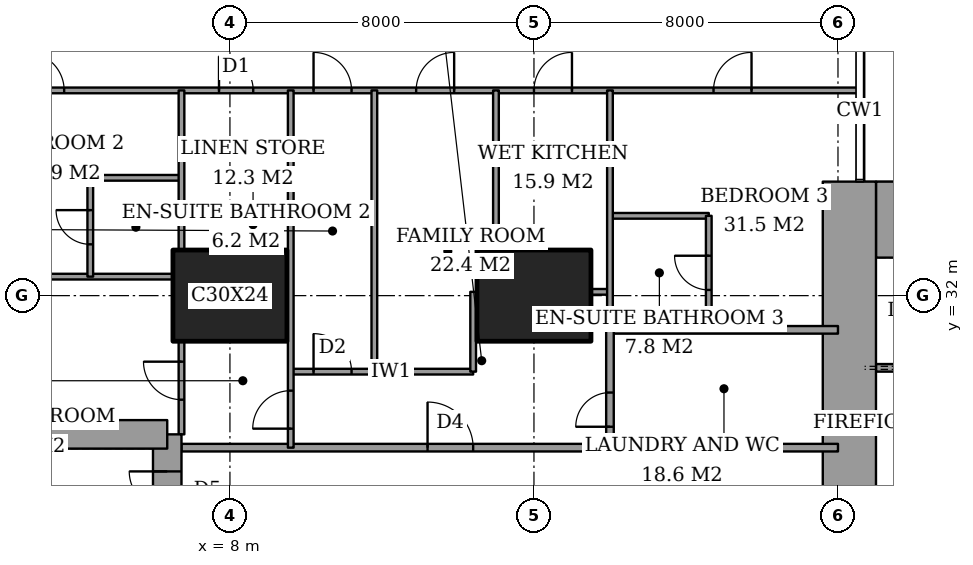
"""IFC4 building model, lengths in metres.
Left out: names, types, materials, properties, quantities, classifications, styles, units other than length and angle.
Written with IfcOpenShell. Run it as: python <this file> out.ifc"""

import sys

from ifc_helpers import new_model, si_unit, direction, frame, frame_2d, origin, origin_2d, place, context, subcontext, project, spatial, rectangle, extrude, element, fill, save


model = new_model("IFC4")
c1 = context("Model", 3, precision=1e-05, world=origin(), true_north=direction((0.0, 1.0)))
c2 = subcontext(c1, "Body", "Model", "MODEL_VIEW")
j1 = project(units=[si_unit("LENGTHUNIT", "METRE"), si_unit("PLANEANGLEUNIT", "RADIAN")], contexts=[c1])
p1 = place(None, origin())
s1 = spatial("IfcSite", under=j1, at=p1, CompositionType="ELEMENT")
p2 = place(p1, origin())
s2 = spatial("IfcBuilding", under=s1, at=p2, CompositionType="ELEMENT")
p3 = place(p2, frame((0.0, 0.0, 47.6)))
s3 = spatial("IfcBuildingStorey", under=s2, at=p3, CompositionType="ELEMENT", Elevation=47.6)
for number, where, z_axis, x_axis in (
    (1, (8.0, 32.0, 0.0), (0.0, 0.0, 1.0), (1.0, 0.0, 0.0)),
    (2, (16.0, 32.0, 0.0), (0.0, 0.0, 1.0), (1.0, 0.0, 0.0)),
):
    element("IfcColumn", number, at=place(p3, frame(where, z_axis=z_axis, x_axis=x_axis)), inside=s3, PredefinedType="COLUMN", context=c2, shape_type="SweptSolid", body=[
        extrude(rectangle(XDim=3.0, YDim=2.4, at=origin_2d()), origin(), (0.0, 0.0, 1.0), 3.6),
    ])
p4 = place(p3, frame((25.0, 34.0, 0.0), z_axis=(0.0, 0.0, 1.0), x_axis=(1.0, 0.0, 0.0)))
e3 = element("IfcWall", 3, at=p4, inside=s3, PredefinedType="SHEAR", context=c2, shape_type="SweptSolid", body=[
    extrude(rectangle(XDim=3.15, YDim=2.0, at=frame_2d((1.575, 0.0))), origin(), (0.0, 0.0, 1.0), 3.6),
])
p5 = place(p3, frame((24.3, 23.15, 0.0), z_axis=(0.0, 0.0, 1.0), x_axis=(0.0, 1.0, 0.0)))
e4 = element("IfcWall", 4, at=p5, inside=s3, PredefinedType="SHEAR", context=c2, shape_type="SweptSolid", body=[
    extrude(rectangle(XDim=11.85, YDim=1.4, at=frame_2d((5.925, 0.0))), origin(), (0.0, 0.0, 1.0), 3.6),
])
p6 = place(p5, frame((0.75, 0.0, 0.0)))
e5 = element("IfcOpeningElement", 5, at=p6, cuts=e4, PredefinedType="OPENING", context=c2, shape_type="SweptSolid", body=[
    extrude(rectangle(XDim=1.8, YDim=2.4, at=frame_2d((0.9, 1.2))), frame((0.0, 0.71, 0.0), z_axis=(0.0, -1.0, 0.0), x_axis=(1.0, 0.0, 0.0)), (0.0, 0.0, 1.0), 1.42),
])
p7 = place(p3, frame((6.35, 19.65, 0.0), z_axis=(0.0, 0.0, 1.0), x_axis=(0.0, 1.0, 0.0)))
e6 = element("IfcWall", 6, at=p7, inside=s3, PredefinedType="SHEAR", context=c2, shape_type="SweptSolid", body=[
    extrude(rectangle(XDim=8.7, YDim=0.75, at=frame_2d((4.35, 0.0))), origin(), (0.0, 0.0, 1.0), 3.6),
])
p8 = place(p7, frame((6.725, 0.0, 0.0)))
e7 = element("IfcOpeningElement", 7, at=p8, cuts=e6, PredefinedType="OPENING", context=c2, shape_type="SweptSolid", body=[
    extrude(rectangle(XDim=1.0, YDim=2.1, at=frame_2d((0.5, 1.05))), frame((0.0, 0.385, 0.0), z_axis=(0.0, -1.0, 0.0), x_axis=(1.0, 0.0, 0.0)), (0.0, 0.0, 1.0), 0.77),
])
p9 = place(p3, frame((6.35, 28.35, 0.0), z_axis=(0.0, 0.0, 1.0), x_axis=(-1.0, 0.0, 0.0)))
e8 = element("IfcWall", 8, at=p9, inside=s3, PredefinedType="SHEAR", context=c2, shape_type="SweptSolid", body=[
    extrude(rectangle(XDim=4.45, YDim=0.75, at=frame_2d((2.225, 0.0))), origin(), (0.0, 0.0, 1.0), 3.6),
])
p10 = place(p3, frame((6.725, 28.0, 0.0), z_axis=(0.0, 0.0, 1.0), x_axis=(1.0, 0.0, 0.0)))
e9 = element("IfcWall", 9, at=p10, inside=s3, PredefinedType="PARTITIONING", context=c2, shape_type="SweptSolid", body=[
    extrude(rectangle(XDim=17.275, YDim=0.2, at=frame_2d((8.637, 0.0))), origin(), (0.0, 0.0, 1.0), 3.35),
])
p11 = place(p10, frame((6.475, 0.0, 0.0)))
e10 = element("IfcOpeningElement", 10, at=p11, cuts=e9, PredefinedType="OPENING", context=c2, shape_type="SweptSolid", body=[
    extrude(rectangle(XDim=1.2, YDim=2.4, at=frame_2d((0.6, 1.2))), frame((0.0, 0.11, 0.0), z_axis=(0.0, -1.0, 0.0), x_axis=(1.0, 0.0, 0.0)), (0.0, 0.0, 1.0), 0.22),
])
p12 = place(p3, frame((9.6, 30.0, 0.0), z_axis=(0.0, 0.0, 1.0), x_axis=(1.0, 0.0, 0.0)))
e11 = element("IfcWall", 11, at=p12, inside=s3, PredefinedType="PARTITIONING", context=c2, shape_type="SweptSolid", body=[
    extrude(rectangle(XDim=4.8, YDim=0.15, at=frame_2d((2.4, 0.0))), origin(), (0.0, 0.0, 1.0), 3.35),
])
p13 = place(p12, frame((0.6, 0.0, 0.0)))
e12 = element("IfcOpeningElement", 12, at=p13, cuts=e11, PredefinedType="OPENING", context=c2, shape_type="SweptSolid", body=[
    extrude(rectangle(XDim=1.0, YDim=2.1, at=frame_2d((0.5, 1.05))), frame((0.0, 0.085, 0.0), z_axis=(0.0, -1.0, 0.0), x_axis=(1.0, 0.0, 0.0)), (0.0, 0.0, 1.0), 0.17),
])
p14 = place(p3, frame((18.0, 31.1, 0.0), z_axis=(0.0, 0.0, 1.0), x_axis=(1.0, 0.0, 0.0)))
e13 = element("IfcWall", 13, at=p14, inside=s3, PredefinedType="PARTITIONING", context=c2, shape_type="SweptSolid", body=[
    extrude(rectangle(XDim=6.0, YDim=0.2, at=frame_2d((3.0, 0.0))), origin(), (0.0, 0.0, 1.0), 3.35),
])
p15 = place(p3, frame((17.5, 32.1, 0.0), z_axis=(0.0, 0.0, 1.0), x_axis=(1.0, 0.0, 0.0)))
e14 = element("IfcWall", 14, at=p15, inside=s3, PredefinedType="PARTITIONING", context=c2, shape_type="SweptSolid", body=[
    extrude(rectangle(XDim=0.5, YDim=0.15, at=frame_2d((0.25, 0.0))), origin(), (0.0, 0.0, 1.0), 2.634),
])
p16 = place(p3, frame((1.35, 32.5, 0.0), z_axis=(0.0, 0.0, 1.0), x_axis=(1.0, 0.0, 0.0)))
e15 = element("IfcWall", 15, at=p16, inside=s3, PredefinedType="PARTITIONING", context=c2, shape_type="SweptSolid", body=[
    extrude(rectangle(XDim=5.15, YDim=0.15, at=frame_2d((2.575, 0.0))), origin(), (0.0, 0.0, 1.0), 3.35),
])
p17 = place(p3, frame((18.0, 34.1, 0.0), z_axis=(0.0, 0.0, 1.0), x_axis=(1.0, 0.0, 0.0)))
e16 = element("IfcWall", 16, at=p17, inside=s3, PredefinedType="PARTITIONING", context=c2, shape_type="SweptSolid", body=[
    extrude(rectangle(XDim=2.6, YDim=0.15, at=frame_2d((1.3, 0.0))), origin(), (0.0, 0.0, 1.0), 3.35),
])
p18 = place(p3, frame((4.325, 35.1, 0.0), z_axis=(0.0, 0.0, 1.0), x_axis=(1.0, 0.0, 0.0)))
e17 = element("IfcWall", 17, at=p18, inside=s3, PredefinedType="PARTITIONING", context=c2, shape_type="SweptSolid", body=[
    extrude(rectangle(XDim=2.4, YDim=0.15, at=frame_2d((1.2, 0.0))), origin(), (0.0, 0.0, 1.0), 3.35),
])
p19 = place(p3, frame((-0.45, 37.4, 0.0), z_axis=(0.0, 0.0, 1.0), x_axis=(1.0, 0.0, 0.0)))
e18 = element("IfcWall", 18, at=p19, inside=s3, PredefinedType="PARTITIONING", context=c2, shape_type="SweptSolid", body=[
    extrude(rectangle(XDim=25.011, YDim=0.15, at=frame_2d((12.505, 0.0))), origin(), (0.0, 0.0, 1.0), 3.35),
])
p20 = place(p19, frame((10.65, 0.0, 0.0)))
e19 = element("IfcOpeningElement", 19, at=p20, cuts=e18, PredefinedType="OPENING", context=c2, shape_type="SweptSolid", body=[
    extrude(rectangle(XDim=1.0, YDim=2.1, at=frame_2d((0.5, 1.05))), frame((0.0, 0.085, 0.0), z_axis=(0.0, -1.0, 0.0), x_axis=(1.0, 0.0, 0.0)), (0.0, 0.0, 1.0), 0.17),
])
p21 = place(p19, frame((3.087, 0.0, 0.0)))
e20 = element("IfcOpeningElement", 20, at=p21, cuts=e18, PredefinedType="OPENING", context=c2, shape_type="SweptSolid", body=[
    extrude(rectangle(XDim=1.0, YDim=2.1, at=frame_2d((0.5, 1.05))), frame((0.0, 0.085, 0.0), z_axis=(0.0, -1.0, 0.0), x_axis=(1.0, 0.0, 0.0)), (0.0, 0.0, 1.0), 0.17),
])
p22 = place(p19, frame((8.163, 0.0, 0.0)))
e21 = element("IfcOpeningElement", 21, at=p22, cuts=e18, PredefinedType="OPENING", context=c2, shape_type="SweptSolid", body=[
    extrude(rectangle(XDim=0.9, YDim=2.1, at=frame_2d((0.45, 1.05))), frame((0.0, 0.085, 0.0), z_axis=(0.0, -1.0, 0.0), x_axis=(1.0, 0.0, 0.0)), (0.0, 0.0, 1.0), 0.17),
])
p23 = place(p19, frame((13.35, 0.0, 0.0)))
e22 = element("IfcOpeningElement", 22, at=p23, cuts=e18, PredefinedType="OPENING", context=c2, shape_type="SweptSolid", body=[
    extrude(rectangle(XDim=1.0, YDim=2.1, at=frame_2d((0.5, 1.05))), frame((0.0, 0.085, 0.0), z_axis=(0.0, -1.0, 0.0), x_axis=(1.0, 0.0, 0.0)), (0.0, 0.0, 1.0), 0.17),
])
p24 = place(p19, frame((16.45, 0.0, 0.0)))
e23 = element("IfcOpeningElement", 23, at=p24, cuts=e18, PredefinedType="OPENING", context=c2, shape_type="SweptSolid", body=[
    extrude(rectangle(XDim=1.0, YDim=2.1, at=frame_2d((0.5, 1.05))), frame((0.0, 0.085, 0.0), z_axis=(0.0, -1.0, 0.0), x_axis=(1.0, 0.0, 0.0)), (0.0, 0.0, 1.0), 0.17),
])
p25 = place(p19, frame((21.175, 0.0, 0.0)))
e24 = element("IfcOpeningElement", 24, at=p25, cuts=e18, PredefinedType="OPENING", context=c2, shape_type="SweptSolid", body=[
    extrude(rectangle(XDim=1.0, YDim=2.1, at=frame_2d((0.5, 1.05))), frame((0.0, 0.085, 0.0), z_axis=(0.0, -1.0, 0.0), x_axis=(1.0, 0.0, 0.0)), (0.0, 0.0, 1.0), 0.17),
])
p26 = place(p3, frame((4.325, 32.5, 0.0), z_axis=(0.0, 0.0, 1.0), x_axis=(0.0, 1.0, 0.0)))
e25 = element("IfcWall", 25, at=p26, inside=s3, PredefinedType="PARTITIONING", context=c2, shape_type="SweptSolid", body=[
    extrude(rectangle(XDim=2.6, YDim=0.15, at=frame_2d((1.3, 0.0))), origin(), (0.0, 0.0, 1.0), 3.35),
])
p27 = place(p26, frame((0.85, 0.0, 0.0)))
e26 = element("IfcOpeningElement", 26, at=p27, cuts=e25, PredefinedType="OPENING", context=c2, shape_type="SweptSolid", body=[
    extrude(rectangle(XDim=0.9, YDim=2.1, at=frame_2d((0.45, 1.05))), frame((0.0, 0.085, 0.0), z_axis=(0.0, -1.0, 0.0), x_axis=(1.0, 0.0, 0.0)), (0.0, 0.0, 1.0), 0.17),
])
p28 = place(p3, frame((6.725, 28.35, 0.0), z_axis=(0.0, 0.0, 1.0), x_axis=(0.0, 1.0, 0.0)))
e27 = element("IfcWall", 27, at=p28, inside=s3, PredefinedType="PARTITIONING", context=c2, shape_type="SweptSolid", body=[
    extrude(rectangle(XDim=2.45, YDim=0.15, at=frame_2d((1.225, 0.0))), origin(), (0.0, 0.0, 1.0), 3.35),
])
p29 = place(p28, frame((0.913, 0.0, 0.0)))
e28 = element("IfcOpeningElement", 28, at=p29, cuts=e27, PredefinedType="OPENING", context=c2, shape_type="SweptSolid", body=[
    extrude(rectangle(XDim=1.0, YDim=2.1, at=frame_2d((0.5, 1.05))), frame((0.0, 0.085, 0.0), z_axis=(0.0, -1.0, 0.0), x_axis=(1.0, 0.0, 0.0)), (0.0, 0.0, 1.0), 0.17),
])
p30 = place(p3, frame((6.725, 33.2, 0.0), z_axis=(0.0, 0.0, 1.0), x_axis=(0.0, 1.0, 0.0)))
e29 = element("IfcWall", 29, at=p30, inside=s3, PredefinedType="PARTITIONING", context=c2, shape_type="SweptSolid", body=[
    extrude(rectangle(XDim=4.2, YDim=0.15, at=frame_2d((2.1, 0.0))), origin(), (0.0, 0.0, 1.0), 3.35),
])
p31 = place(p3, frame((9.6, 28.0, 0.0), z_axis=(0.0, 0.0, 1.0), x_axis=(0.0, 1.0, 0.0)))
e30 = element("IfcWall", 30, at=p31, inside=s3, PredefinedType="PARTITIONING", context=c2, shape_type="SweptSolid", body=[
    extrude(rectangle(XDim=9.4, YDim=0.15, at=frame_2d((4.7, 0.0))), origin(), (0.0, 0.0, 1.0), 3.35),
])
p32 = place(p31, frame((0.5, 0.0, 0.0)))
e31 = element("IfcOpeningElement", 31, at=p32, cuts=e30, PredefinedType="OPENING", context=c2, shape_type="SweptSolid", body=[
    extrude(rectangle(XDim=1.0, YDim=2.1, at=frame_2d((0.5, 1.05))), frame((0.0, 0.085, 0.0), z_axis=(0.0, -1.0, 0.0), x_axis=(1.0, 0.0, 0.0)), (0.0, 0.0, 1.0), 0.17),
])
p33 = place(p3, frame((11.8, 30.0, 0.0), z_axis=(0.0, 0.0, 1.0), x_axis=(0.0, 1.0, 0.0)))
e32 = element("IfcWall", 32, at=p33, inside=s3, PredefinedType="PARTITIONING", context=c2, shape_type="SweptSolid", body=[
    extrude(rectangle(XDim=7.4, YDim=0.15, at=frame_2d((3.7, 0.0))), origin(), (0.0, 0.0, 1.0), 3.35),
])
p34 = place(p3, frame((14.4, 30.0, 0.0), z_axis=(0.0, 0.0, 1.0), x_axis=(0.0, 1.0, 0.0)))
e33 = element("IfcWall", 33, at=p34, inside=s3, PredefinedType="PARTITIONING", context=c2, shape_type="SweptSolid", body=[
    extrude(rectangle(XDim=2.1, YDim=0.15, at=frame_2d((1.05, 0.0))), origin(), (0.0, 0.0, 1.0), 3.35),
])
p35 = place(p3, frame((15.0, 33.2, 0.0), z_axis=(0.0, 0.0, 1.0), x_axis=(0.0, 1.0, 0.0)))
e34 = element("IfcWall", 34, at=p35, inside=s3, PredefinedType="PARTITIONING", context=c2, shape_type="SweptSolid", body=[
    extrude(rectangle(XDim=4.2, YDim=0.15, at=frame_2d((2.1, 0.0))), origin(), (0.0, 0.0, 1.0), 3.35),
])
p36 = place(p3, frame((18.0, 28.0, 0.0), z_axis=(0.0, 0.0, 1.0), x_axis=(0.0, 1.0, 0.0)))
e35 = element("IfcWall", 35, at=p36, inside=s3, PredefinedType="PARTITIONING", context=c2, shape_type="SweptSolid", body=[
    extrude(rectangle(XDim=3.1, YDim=0.2, at=frame_2d((1.55, 0.0))), origin(), (0.0, 0.0, 1.0), 3.35),
])
p37 = place(p36, frame((0.55, 0.0, 0.0)))
e36 = element("IfcOpeningElement", 36, at=p37, cuts=e35, PredefinedType="OPENING", context=c2, shape_type="SweptSolid", body=[
    extrude(rectangle(XDim=0.9, YDim=2.1, at=frame_2d((0.45, 1.05))), frame((0.0, 0.11, 0.0), z_axis=(0.0, -1.0, 0.0), x_axis=(1.0, 0.0, 0.0)), (0.0, 0.0, 1.0), 0.22),
])
p38 = place(p3, frame((18.0, 31.1, 0.0), z_axis=(0.0, 0.0, 1.0), x_axis=(0.0, 1.0, 0.0)))
e37 = element("IfcWall", 37, at=p38, inside=s3, PredefinedType="PARTITIONING", context=c2, shape_type="SweptSolid", body=[
    extrude(rectangle(XDim=6.3, YDim=0.15, at=frame_2d((3.15, 0.0))), origin(), (0.0, 0.0, 1.0), 3.35),
])
p39 = place(p3, frame((20.6, 31.1, 0.0), z_axis=(0.0, 0.0, 1.0), x_axis=(0.0, 1.0, 0.0)))
e38 = element("IfcWall", 38, at=p39, inside=s3, PredefinedType="PARTITIONING", context=c2, shape_type="SweptSolid", body=[
    extrude(rectangle(XDim=3.0, YDim=0.15, at=frame_2d((1.5, 0.0))), origin(), (0.0, 0.0, 1.0), 3.35),
])
p40 = place(p39, frame((1.05, 0.0, 0.0)))
e39 = element("IfcOpeningElement", 39, at=p40, cuts=e38, PredefinedType="OPENING", context=c2, shape_type="SweptSolid", body=[
    extrude(rectangle(XDim=0.9, YDim=2.1, at=frame_2d((0.45, 1.05))), frame((0.0, 0.085, 0.0), z_axis=(0.0, -1.0, 0.0), x_axis=(1.0, 0.0, 0.0)), (0.0, 0.0, 1.0), 0.17),
])
p41 = place(p3, frame((25.0, 30.1, 0.0), z_axis=(0.0, 0.0, 1.0), x_axis=(1.0, 0.0, 0.0)))
e40 = element("IfcWall", 40, at=p41, inside=s3, PredefinedType="PARTITIONING", context=c2, shape_type="SweptSolid", body=[
    extrude(rectangle(XDim=12.7, YDim=0.2, at=frame_2d((6.35, 0.0))), origin(), (0.0, 0.0, 1.0), 3.6),
])
p42 = place(p41, frame((0.9, 0.0, 0.0)))
e41 = element("IfcOpeningElement", 41, at=p42, cuts=e40, PredefinedType="OPENING", context=c2, shape_type="SweptSolid", body=[
    extrude(rectangle(XDim=1.2, YDim=2.1, at=frame_2d((0.6, 1.05))), frame((0.0, 0.11, 0.0), z_axis=(0.0, -1.0, 0.0), x_axis=(1.0, 0.0, 0.0)), (0.0, 0.0, 1.0), 0.22),
])
p43 = place(p20, origin())
e42 = element("IfcDoor", 42, at=p43, inside=s3, OperationType="SINGLE_SWING_RIGHT", PredefinedType="DOOR", context=c2, shape_type="SweptSolid", body=[
    extrude(rectangle(XDim=1.0, YDim=2.1, at=frame_2d((0.5, 1.05))), frame((0.0, 0.025, 0.0), z_axis=(0.0, -1.0, 0.0), x_axis=(1.0, 0.0, 0.0)), (0.0, 0.0, 1.0), 0.05),
])
fill(e19, e42)
p44 = place(p27, origin())
e43 = element("IfcDoor", 43, at=p44, inside=s3, OperationType="SINGLE_SWING_LEFT", PredefinedType="DOOR", context=c2, shape_type="SweptSolid", body=[
    extrude(rectangle(XDim=0.9, YDim=2.1, at=frame_2d((0.45, 1.05))), frame((0.0, 0.025, 0.0), z_axis=(0.0, -1.0, 0.0), x_axis=(1.0, 0.0, 0.0)), (0.0, 0.0, 1.0), 0.05),
])
fill(e26, e43)
p45 = place(p21, origin())
e44 = element("IfcDoor", 44, at=p45, inside=s3, OperationType="SINGLE_SWING_RIGHT", PredefinedType="DOOR", context=c2, shape_type="SweptSolid", body=[
    extrude(rectangle(XDim=1.0, YDim=2.1, at=frame_2d((0.5, 1.05))), frame((0.0, 0.025, 0.0), z_axis=(0.0, -1.0, 0.0), x_axis=(1.0, 0.0, 0.0)), (0.0, 0.0, 1.0), 0.05),
])
fill(e20, e44)
p46 = place(p29, origin())
e45 = element("IfcDoor", 45, at=p46, inside=s3, OperationType="SINGLE_SWING_LEFT", PredefinedType="DOOR", context=c2, shape_type="SweptSolid", body=[
    extrude(rectangle(XDim=1.0, YDim=2.1, at=frame_2d((0.5, 1.05))), frame((0.0, 0.025, 0.0), z_axis=(0.0, -1.0, 0.0), x_axis=(1.0, 0.0, 0.0)), (0.0, 0.0, 1.0), 0.05),
])
fill(e28, e45)
p47 = place(p22, origin())
e46 = element("IfcDoor", 46, at=p47, inside=s3, OperationType="SINGLE_SWING_RIGHT", PredefinedType="DOOR", context=c2, shape_type="SweptSolid", body=[
    extrude(rectangle(XDim=0.9, YDim=2.1, at=frame_2d((0.45, 1.05))), frame((0.0, 0.025, 0.0), z_axis=(0.0, -1.0, 0.0), x_axis=(1.0, 0.0, 0.0)), (0.0, 0.0, 1.0), 0.05),
])
fill(e21, e46)
p48 = place(p32, origin())
e47 = element("IfcDoor", 47, at=p48, inside=s3, OperationType="SINGLE_SWING_RIGHT", PredefinedType="DOOR", context=c2, shape_type="SweptSolid", body=[
    extrude(rectangle(XDim=1.0, YDim=2.1, at=frame_2d((0.5, 1.05))), frame((0.0, 0.025, 0.0), z_axis=(0.0, -1.0, 0.0), x_axis=(1.0, 0.0, 0.0)), (0.0, 0.0, 1.0), 0.05),
])
fill(e31, e47)
p49 = place(p11, origin())
e48 = element("IfcDoor", 48, at=p49, inside=s3, OperationType="SINGLE_SWING_RIGHT", PredefinedType="DOOR", context=c2, shape_type="SweptSolid", body=[
    extrude(rectangle(XDim=1.2, YDim=2.4, at=frame_2d((0.6, 1.2))), frame((0.0, 0.025, 0.0), z_axis=(0.0, -1.0, 0.0), x_axis=(1.0, 0.0, 0.0)), (0.0, 0.0, 1.0), 0.05),
])
fill(e10, e48)
p50 = place(p13, origin())
e49 = element("IfcDoor", 49, at=p50, inside=s3, OperationType="SINGLE_SWING_RIGHT", PredefinedType="DOOR", context=c2, shape_type="SweptSolid", body=[
    extrude(rectangle(XDim=1.0, YDim=2.1, at=frame_2d((0.5, 1.05))), frame((0.0, 0.025, 0.0), z_axis=(0.0, -1.0, 0.0), x_axis=(1.0, 0.0, 0.0)), (0.0, 0.0, 1.0), 0.05),
])
fill(e12, e49)
p51 = place(p23, origin())
e50 = element("IfcDoor", 50, at=p51, inside=s3, OperationType="SINGLE_SWING_LEFT", PredefinedType="DOOR", context=c2, shape_type="SweptSolid", body=[
    extrude(rectangle(XDim=1.0, YDim=2.1, at=frame_2d((0.5, 1.05))), frame((0.0, 0.025, 0.0), z_axis=(0.0, -1.0, 0.0), x_axis=(1.0, 0.0, 0.0)), (0.0, 0.0, 1.0), 0.05),
])
fill(e22, e50)
p52 = place(p24, origin())
e51 = element("IfcDoor", 51, at=p52, inside=s3, OperationType="SINGLE_SWING_LEFT", PredefinedType="DOOR", context=c2, shape_type="SweptSolid", body=[
    extrude(rectangle(XDim=1.0, YDim=2.1, at=frame_2d((0.5, 1.05))), frame((0.0, 0.025, 0.0), z_axis=(0.0, -1.0, 0.0), x_axis=(1.0, 0.0, 0.0)), (0.0, 0.0, 1.0), 0.05),
])
fill(e23, e51)
p53 = place(p40, origin())
e52 = element("IfcDoor", 52, at=p53, inside=s3, OperationType="SINGLE_SWING_LEFT", PredefinedType="DOOR", context=c2, shape_type="SweptSolid", body=[
    extrude(rectangle(XDim=0.9, YDim=2.1, at=frame_2d((0.45, 1.05))), frame((0.0, 0.025, 0.0), z_axis=(0.0, -1.0, 0.0), x_axis=(1.0, 0.0, 0.0)), (0.0, 0.0, 1.0), 0.05),
])
fill(e39, e52)
p54 = place(p25, origin())
e53 = element("IfcDoor", 53, at=p54, inside=s3, OperationType="SINGLE_SWING_LEFT", PredefinedType="DOOR", context=c2, shape_type="SweptSolid", body=[
    extrude(rectangle(XDim=1.0, YDim=2.1, at=frame_2d((0.5, 1.05))), frame((0.0, 0.025, 0.0), z_axis=(0.0, -1.0, 0.0), x_axis=(1.0, 0.0, 0.0)), (0.0, 0.0, 1.0), 0.05),
])
fill(e24, e53)
p55 = place(p37, origin())
e54 = element("IfcDoor", 54, at=p55, inside=s3, OperationType="SINGLE_SWING_RIGHT", PredefinedType="DOOR", context=c2, shape_type="SweptSolid", body=[
    extrude(rectangle(XDim=0.9, YDim=2.1, at=frame_2d((0.45, 1.05))), frame((0.0, 0.025, 0.0), z_axis=(0.0, -1.0, 0.0), x_axis=(1.0, 0.0, 0.0)), (0.0, 0.0, 1.0), 0.05),
])
fill(e36, e54)
p56 = place(p8, origin())
e55 = element("IfcDoor", 55, at=p56, inside=s3, OperationType="SINGLE_SWING_LEFT", PredefinedType="DOOR", context=c2, shape_type="SweptSolid", body=[
    extrude(rectangle(XDim=1.0, YDim=2.1, at=frame_2d((0.5, 1.05))), frame((0.0, 0.025, 0.0), z_axis=(0.0, -1.0, 0.0), x_axis=(1.0, 0.0, 0.0)), (0.0, 0.0, 1.0), 0.05),
])
fill(e7, e55)
save(model, sys.argv[1])
